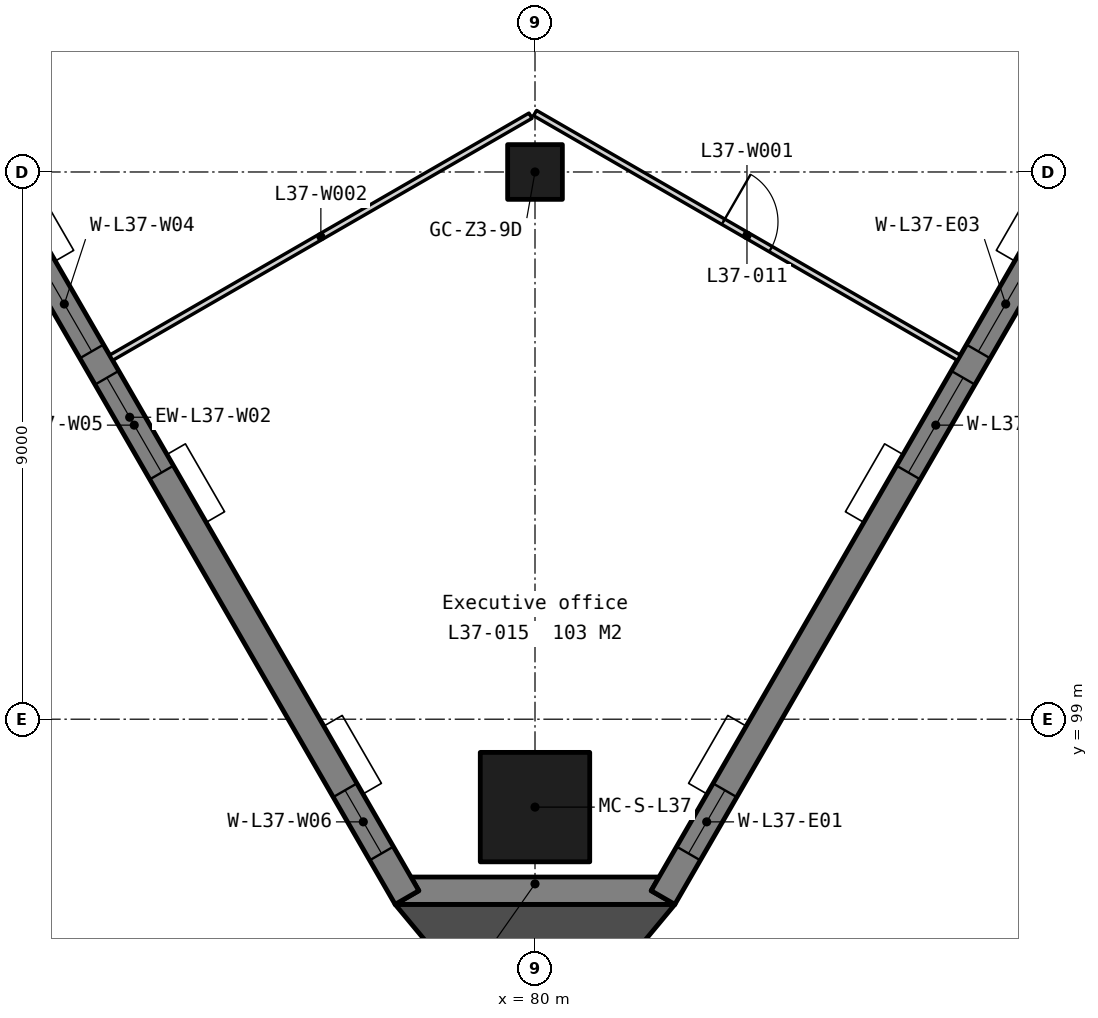
"""IFC4 building model, lengths in metres.
Left out: names, types, materials, properties, quantities, classifications, styles, units other than length and angle.
Written with IfcOpenShell. Run it as: python <this file> out.ifc"""

import sys

from ifc_helpers import new_model, si_unit, direction, frame, frame_2d, origin, origin_2d, place, context, subcontext, project, spatial, polyline, rectangle, outline, extrude, element, fill, save


model = new_model("IFC4")
c1 = context("Model", 3, precision=1e-05, world=origin(), true_north=direction((0.0, 1.0)))
c2 = subcontext(c1, "Body", "Model", "MODEL_VIEW")
j1 = project(units=[si_unit("LENGTHUNIT", "METRE"), si_unit("PLANEANGLEUNIT", "RADIAN")], contexts=[c1])
p1 = place(None, origin())
s1 = spatial("IfcSite", under=j1, at=p1, CompositionType="ELEMENT")
p2 = place(p1, origin())
s2 = spatial("IfcBuilding", under=s1, at=p2, CompositionType="ELEMENT")
p3 = place(p2, frame((0.0, 0.0, 148.1)))
s3 = spatial("IfcBuildingStorey", under=s2, at=p3, CompositionType="ELEMENT", Elevation=148.1)
p4 = place(p3, frame((80.0, 108.0, 0.0), z_axis=(0.0, 0.0, 1.0), x_axis=(1.0, 0.0, 0.0)))
e1 = element("IfcColumn", 1, at=p4, inside=s3, PredefinedType="COLUMN", context=c2, shape_type="SweptSolid", body=[
    extrude(rectangle(XDim=0.9, YDim=0.9, at=origin_2d()), origin(), (0.0, 0.0, 1.0), 3.9),
])
p5 = place(p3, frame((80.0, 97.554, 0.0), z_axis=(0.0, 0.0, 1.0), x_axis=(1.0, 0.0, 0.0)))
e2 = element("IfcColumn", 2, at=p5, inside=s3, PredefinedType="COLUMN", context=c2, shape_type="SweptSolid", body=[
    extrude(rectangle(XDim=1.8, YDim=1.8, at=origin_2d()), origin(), (0.0, 0.0, 1.0), 3.9),
])
p6 = place(p3, frame((0.0, 0.0, -0.15)))
e3 = element("IfcWall", 3, at=p6, inside=s3, PredefinedType="SOLIDWALL", context=c2, shape_type="SweptSolid", body=[
    extrude(outline(polyline([(77.7, 95.954), (78.09, 96.179), (77.96, 96.404), (82.04, 96.404), (81.91, 96.179), (82.3, 95.954), (77.7, 95.954)])), origin(), (0.0, 0.0, 1.0), 3.9),
])
p7 = place(p3, frame((68.773, 111.866, -0.15), z_axis=(0.0, 0.0, 1.0), x_axis=(0.499989280757, -0.866031592454, 0.0)))
e4 = element("IfcWall", 4, at=p7, inside=s3, PredefinedType="SOLIDWALL", context=c2, shape_type="SweptSolid", body=[
    extrude(outline(polyline([(18.243, 3.9), (18.243, 0.0), (0.0, 0.0), (0.0, 3.9), (18.243, 3.9)])), frame((0.0, 0.225, 0.0), z_axis=(0.0, -1.0, 0.0), x_axis=(1.0, 0.0, 0.0)), (0.0, 0.0, 1.0), 0.45),
])
p8 = place(p7, frame((6.072, 0.0, 0.95)))
e5 = element("IfcOpeningElement", 5, at=p8, cuts=e4, PredefinedType="OPENING", context=c2, shape_type="SweptSolid", body=[
    extrude(rectangle(XDim=1.8, YDim=2.2, at=frame_2d((0.9, 1.1))), frame((0.0, 0.235, 0.0), z_axis=(0.0, -1.0, 0.0), x_axis=(1.0, 0.0, 0.0)), (0.0, 0.0, 1.0), 0.47),
])
p9 = place(p7, frame((8.372, 0.0, 0.95)))
e6 = element("IfcOpeningElement", 6, at=p9, cuts=e4, PredefinedType="OPENING", context=c2, shape_type="SweptSolid", body=[
    extrude(rectangle(XDim=1.8, YDim=2.2, at=frame_2d((0.9, 1.1))), frame((0.0, 0.235, 0.0), z_axis=(0.0, -1.0, 0.0), x_axis=(1.0, 0.0, 0.0)), (0.0, 0.0, 1.0), 0.47),
])
p10 = place(p7, frame((16.206, 0.0, 0.95)))
e7 = element("IfcOpeningElement", 7, at=p10, cuts=e4, PredefinedType="OPENING", context=c2, shape_type="SweptSolid", body=[
    extrude(rectangle(XDim=1.2, YDim=2.2, at=frame_2d((0.6, 1.1))), frame((0.0, 0.235, 0.0), z_axis=(0.0, -1.0, 0.0), x_axis=(1.0, 0.0, 0.0)), (0.0, 0.0, 1.0), 0.47),
])
p11 = place(p3, frame((82.105, 96.067, -0.15), z_axis=(0.0, 0.0, 1.0), x_axis=(0.499997369791, 0.866026922331, 0.0)))
e8 = element("IfcWall", 8, at=p11, inside=s3, PredefinedType="SOLIDWALL", context=c2, shape_type="SweptSolid", body=[
    extrude(outline(polyline([(40.486, 0.0), (40.486, 3.9), (0.0, 3.9), (0.0, 0.0), (40.486, 0.0)])), frame((0.0, 0.225, 0.0), z_axis=(0.0, -1.0, 0.0), x_axis=(1.0, 0.0, 0.0)), (0.0, 0.0, 1.0), 0.45),
])
p12 = place(p11, frame((0.837, 0.0, 0.95)))
e9 = element("IfcOpeningElement", 9, at=p12, cuts=e8, PredefinedType="OPENING", context=c2, shape_type="SweptSolid", body=[
    extrude(rectangle(XDim=1.2, YDim=2.2, at=frame_2d((0.6, 1.1))), frame((0.0, 0.235, 0.0), z_axis=(0.0, -1.0, 0.0), x_axis=(1.0, 0.0, 0.0)), (0.0, 0.0, 1.0), 0.47),
])
p13 = place(p11, frame((8.072, 0.0, 0.95)))
e10 = element("IfcOpeningElement", 10, at=p13, cuts=e8, PredefinedType="OPENING", context=c2, shape_type="SweptSolid", body=[
    extrude(rectangle(XDim=1.8, YDim=2.2, at=frame_2d((0.9, 1.1))), frame((0.0, 0.235, 0.0), z_axis=(0.0, -1.0, 0.0), x_axis=(1.0, 0.0, 0.0)), (0.0, 0.0, 1.0), 0.47),
])
p14 = place(p11, frame((10.372, 0.0, 0.95)))
e11 = element("IfcOpeningElement", 11, at=p14, cuts=e8, PredefinedType="OPENING", context=c2, shape_type="SweptSolid", body=[
    extrude(rectangle(XDim=1.8, YDim=2.2, at=frame_2d((0.9, 1.1))), frame((0.0, 0.235, 0.0), z_axis=(0.0, -1.0, 0.0), x_axis=(1.0, 0.0, 0.0)), (0.0, 0.0, 1.0), 0.47),
])
p15 = place(p11, frame((18.193, 0.0, 0.95)))
e12 = element("IfcOpeningElement", 12, at=p15, cuts=e8, PredefinedType="OPENING", context=c2, shape_type="SweptSolid", body=[
    extrude(rectangle(XDim=1.8, YDim=2.2, at=frame_2d((0.9, 1.1))), frame((0.0, 0.235, 0.0), z_axis=(0.0, -1.0, 0.0), x_axis=(1.0, 0.0, 0.0)), (0.0, 0.0, 1.0), 0.47),
])
p16 = place(p11, frame((20.493, 0.0, 0.95)))
e13 = element("IfcOpeningElement", 13, at=p16, cuts=e8, PredefinedType="OPENING", context=c2, shape_type="SweptSolid", body=[
    extrude(rectangle(XDim=1.8, YDim=2.2, at=frame_2d((0.9, 1.1))), frame((0.0, 0.235, 0.0), z_axis=(0.0, -1.0, 0.0), x_axis=(1.0, 0.0, 0.0)), (0.0, 0.0, 1.0), 0.47),
])
p17 = place(p11, frame((28.315, 0.0, 0.95)))
e14 = element("IfcOpeningElement", 14, at=p17, cuts=e8, PredefinedType="OPENING", context=c2, shape_type="SweptSolid", body=[
    extrude(rectangle(XDim=1.8, YDim=2.2, at=frame_2d((0.9, 1.1))), frame((0.0, 0.235, 0.0), z_axis=(0.0, -1.0, 0.0), x_axis=(1.0, 0.0, 0.0)), (0.0, 0.0, 1.0), 0.47),
])
p18 = place(p11, frame((30.615, 0.0, 0.95)))
e15 = element("IfcOpeningElement", 15, at=p18, cuts=e8, PredefinedType="OPENING", context=c2, shape_type="SweptSolid", body=[
    extrude(rectangle(XDim=1.8, YDim=2.2, at=frame_2d((0.9, 1.1))), frame((0.0, 0.235, 0.0), z_axis=(0.0, -1.0, 0.0), x_axis=(1.0, 0.0, 0.0)), (0.0, 0.0, 1.0), 0.47),
])
p19 = place(p11, frame((38.449, 0.0, 0.95)))
e16 = element("IfcOpeningElement", 16, at=p19, cuts=e8, PredefinedType="OPENING", context=c2, shape_type="SweptSolid", body=[
    extrude(rectangle(XDim=1.2, YDim=2.2, at=frame_2d((0.6, 1.1))), frame((0.0, 0.235, 0.0), z_axis=(0.0, -1.0, 0.0), x_axis=(1.0, 0.0, 0.0)), (0.0, 0.0, 1.0), 0.47),
])
p20 = place(p3, frame((0.0, 0.0, -0.15)))
e17 = element("IfcWall", 17, at=p20, inside=s3, PredefinedType="SOLIDWALL", context=c2, shape_type="SweptSolid", body=[
    extrude(outline(polyline([(77.7, 95.954), (80.0, 93.187), (82.3, 95.954), (77.7, 95.954)])), origin(), (0.0, 0.0, 1.0), 3.9),
])
p21 = place(p3, frame((80.001, 108.969, 0.0), z_axis=(0.0, 0.0, 1.0), x_axis=(0.866022419898, -0.500005168208, 0.0)))
e18 = element("IfcWall", 18, at=p21, inside=s3, PredefinedType="PARTITIONING", context=c2, shape_type="SweptSolid", body=[
    extrude(rectangle(XDim=8.048, YDim=0.1, at=frame_2d((4.024, 0.0))), origin(), (0.0, 0.0, 1.0), 3.75),
])
p22 = place(p21, frame((3.574, 0.0, 0.0)))
e19 = element("IfcOpeningElement", 19, at=p22, cuts=e18, PredefinedType="OPENING", context=c2, shape_type="SweptSolid", body=[
    extrude(rectangle(XDim=0.9, YDim=2.1, at=frame_2d((0.45, 1.05))), frame((0.0, 0.06, 0.0), z_axis=(0.0, -1.0, 0.0), x_axis=(1.0, 0.0, 0.0)), (0.0, 0.0, 1.0), 0.12),
])
p23 = place(p3, frame((73.031, 104.946, 0.0), z_axis=(0.0, 0.0, 1.0), x_axis=(0.866093165525, 0.499882614851, 0.0)))
e20 = element("IfcWall", 20, at=p23, inside=s3, PredefinedType="PARTITIONING", context=c2, shape_type="SweptSolid", body=[
    extrude(rectangle(XDim=7.961, YDim=0.1, at=frame_2d((3.981, 0.0))), origin(), (0.0, 0.0, 1.0), 3.75),
])
p24 = place(p3, frame((82.875, 113.153, 0.0), z_axis=(0.0, 0.0, 1.0), x_axis=(0.866037336609, -0.499979331172, 0.0)))
e21 = element("IfcWall", 21, at=p24, inside=s3, PredefinedType="PARTITIONING", context=c2, shape_type="SweptSolid", body=[
    extrude(rectangle(XDim=7.651, YDim=0.2, at=frame_2d((3.826, 0.0))), origin(), (0.0, 0.0, 1.0), 3.75),
])
p25 = place(p8, origin())
e22 = element("IfcWindow", 22, at=p25, inside=s3, PartitioningType="SINGLE_PANEL", PredefinedType="WINDOW", context=c2, shape_type="SweptSolid", body=[
    extrude(rectangle(XDim=1.8, YDim=2.2, at=frame_2d((0.9, 1.1))), frame((0.0, 0.03, 0.0), z_axis=(0.0, -1.0, 0.0), x_axis=(1.0, 0.0, 0.0)), (0.0, 0.0, 1.0), 0.06),
])
fill(e5, e22)
p26 = place(p9, origin())
e23 = element("IfcWindow", 23, at=p26, inside=s3, PartitioningType="SINGLE_PANEL", PredefinedType="WINDOW", context=c2, shape_type="SweptSolid", body=[
    extrude(rectangle(XDim=1.8, YDim=2.2, at=frame_2d((0.9, 1.1))), frame((0.0, 0.03, 0.0), z_axis=(0.0, -1.0, 0.0), x_axis=(1.0, 0.0, 0.0)), (0.0, 0.0, 1.0), 0.06),
])
fill(e6, e23)
p27 = place(p10, origin())
e24 = element("IfcWindow", 24, at=p27, inside=s3, PartitioningType="SINGLE_PANEL", PredefinedType="WINDOW", context=c2, shape_type="SweptSolid", body=[
    extrude(rectangle(XDim=1.2, YDim=2.2, at=frame_2d((0.6, 1.1))), frame((0.0, 0.03, 0.0), z_axis=(0.0, -1.0, 0.0), x_axis=(1.0, 0.0, 0.0)), (0.0, 0.0, 1.0), 0.06),
])
fill(e7, e24)
p28 = place(p12, origin())
e25 = element("IfcWindow", 25, at=p28, inside=s3, PartitioningType="SINGLE_PANEL", PredefinedType="WINDOW", context=c2, shape_type="SweptSolid", body=[
    extrude(rectangle(XDim=1.2, YDim=2.2, at=frame_2d((0.6, 1.1))), frame((0.0, 0.03, 0.0), z_axis=(0.0, -1.0, 0.0), x_axis=(1.0, 0.0, 0.0)), (0.0, 0.0, 1.0), 0.06),
])
fill(e9, e25)
p29 = place(p13, origin())
e26 = element("IfcWindow", 26, at=p29, inside=s3, PartitioningType="SINGLE_PANEL", PredefinedType="WINDOW", context=c2, shape_type="SweptSolid", body=[
    extrude(rectangle(XDim=1.8, YDim=2.2, at=frame_2d((0.9, 1.1))), frame((0.0, 0.03, 0.0), z_axis=(0.0, -1.0, 0.0), x_axis=(1.0, 0.0, 0.0)), (0.0, 0.0, 1.0), 0.06),
])
fill(e10, e26)
p30 = place(p14, origin())
e27 = element("IfcWindow", 27, at=p30, inside=s3, PartitioningType="SINGLE_PANEL", PredefinedType="WINDOW", context=c2, shape_type="SweptSolid", body=[
    extrude(rectangle(XDim=1.8, YDim=2.2, at=frame_2d((0.9, 1.1))), frame((0.0, 0.03, 0.0), z_axis=(0.0, -1.0, 0.0), x_axis=(1.0, 0.0, 0.0)), (0.0, 0.0, 1.0), 0.06),
])
fill(e11, e27)
p31 = place(p22, origin())
e28 = element("IfcDoor", 28, at=p31, inside=s3, OperationType="SINGLE_SWING_LEFT", PredefinedType="DOOR", context=c2, shape_type="SweptSolid", body=[
    extrude(rectangle(XDim=0.9, YDim=2.1, at=frame_2d((0.45, 1.05))), frame((0.0, 0.025, 0.0), z_axis=(0.0, -1.0, 0.0), x_axis=(1.0, 0.0, 0.0)), (0.0, 0.0, 1.0), 0.05),
])
fill(e19, e28)
save(model, sys.argv[1])
